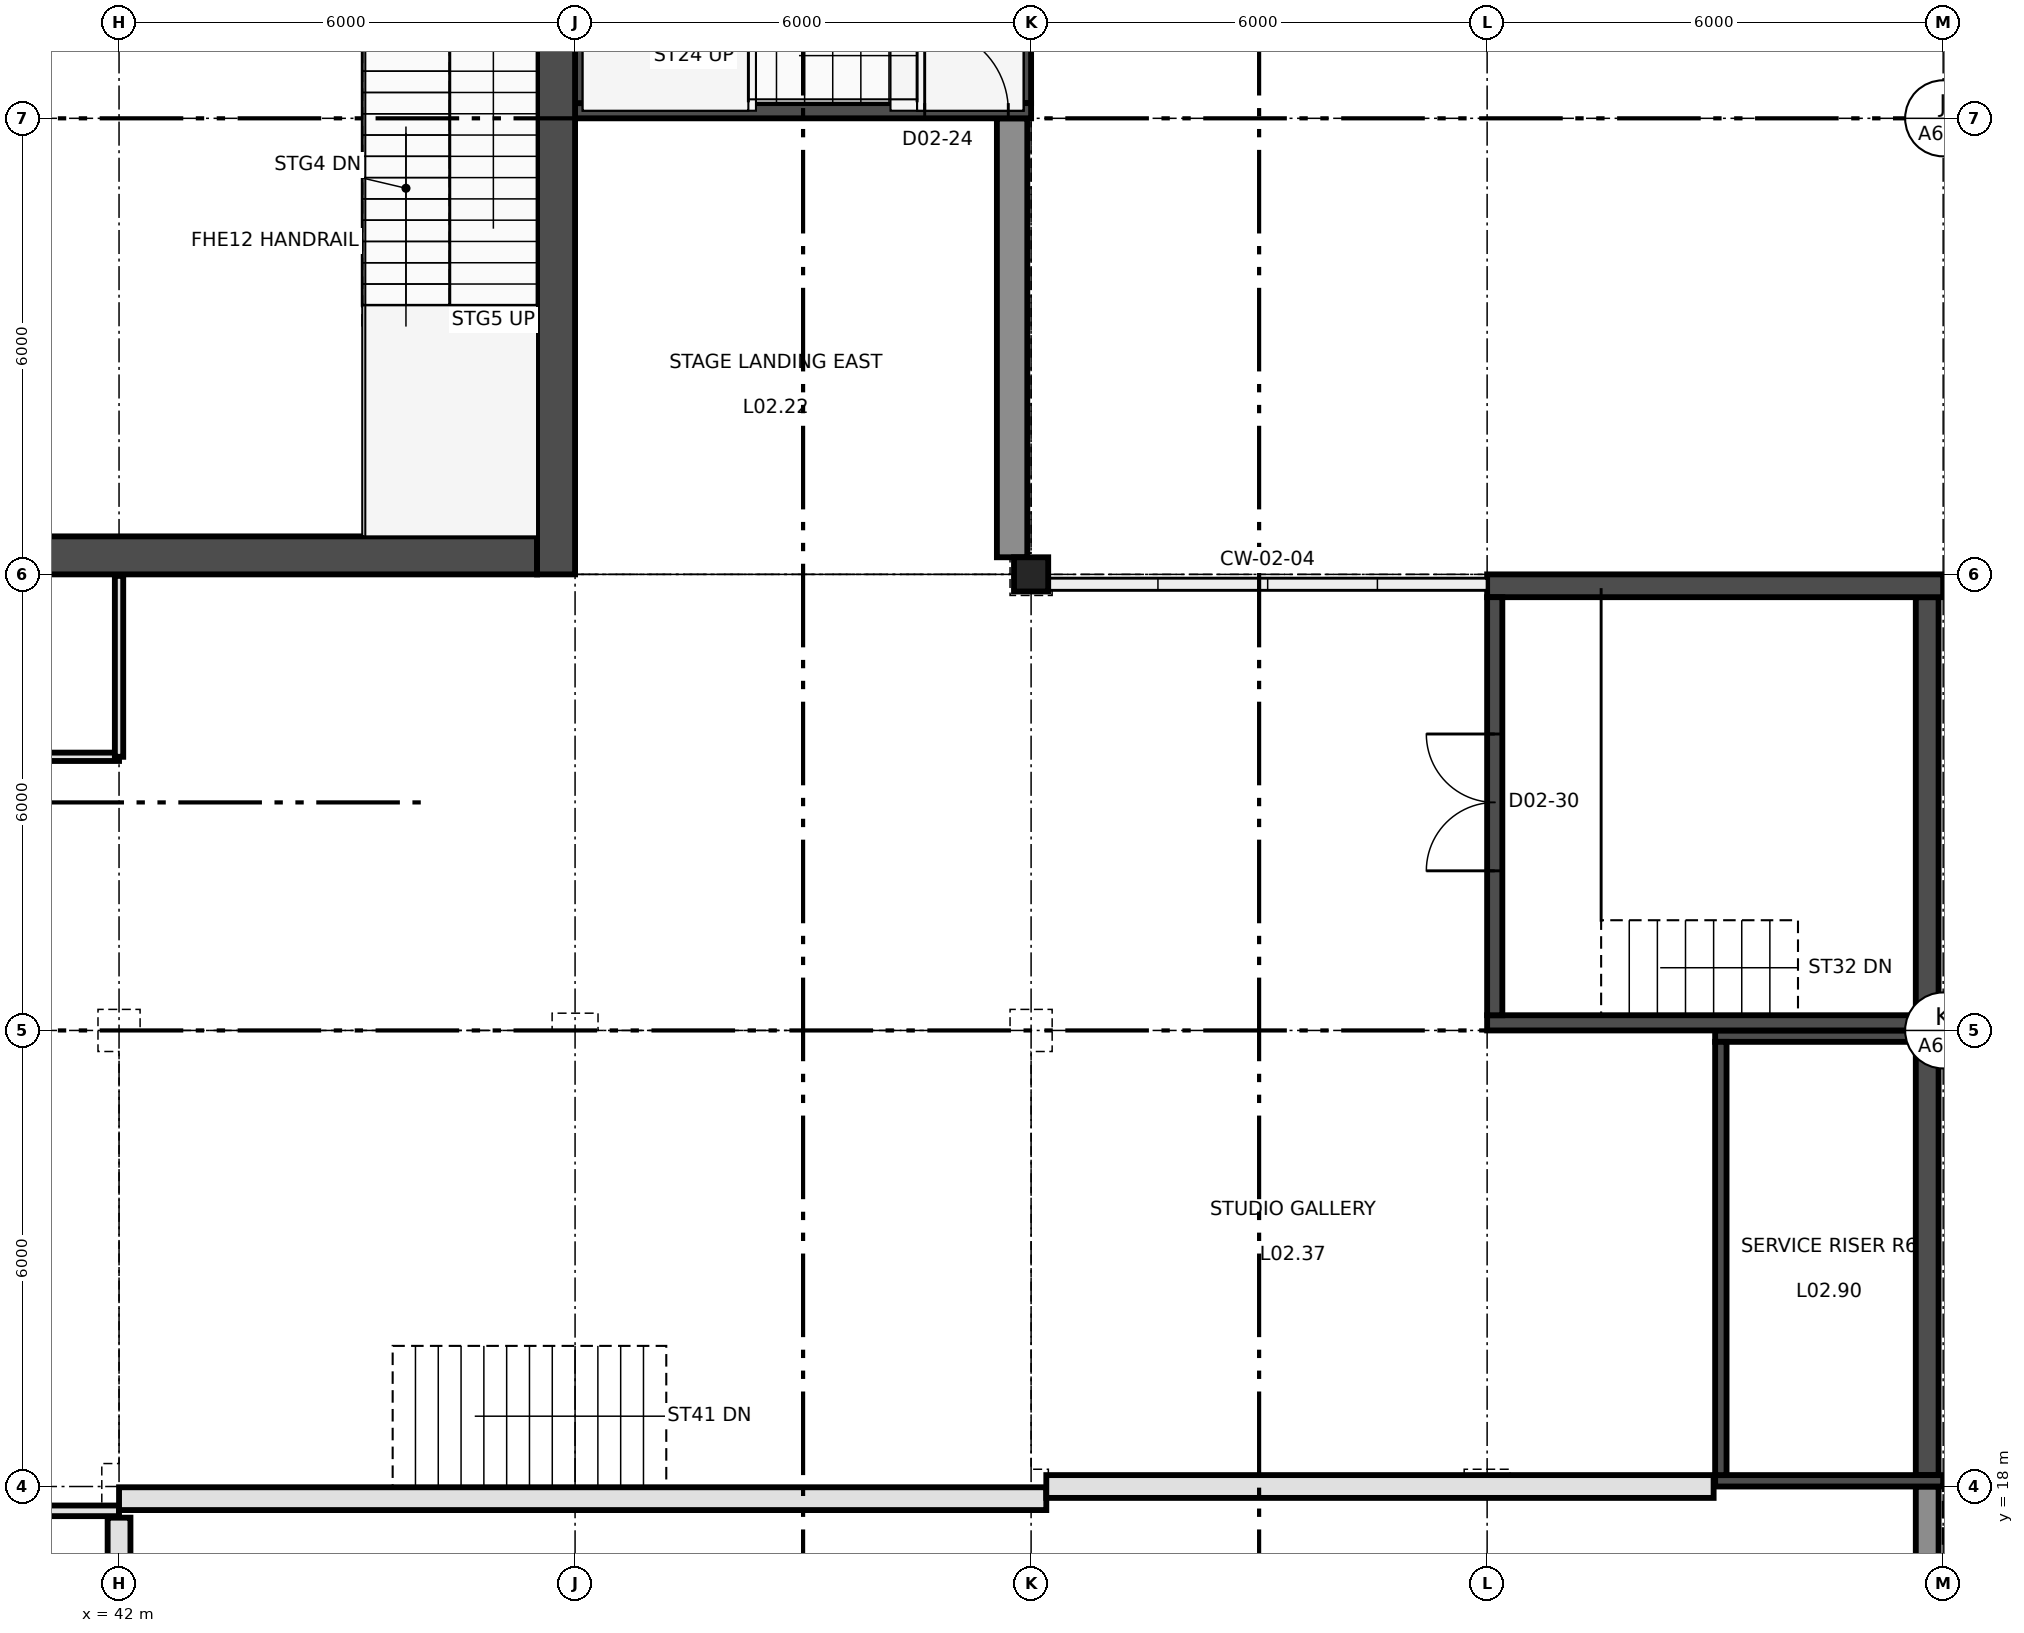
"""IFC4 building model, lengths in metres.
Left out: names, types, materials, properties, quantities, classifications, styles, units other than length and angle.
Written with IfcOpenShell. Run it as: python <this file> out.ifc"""

import sys

from ifc_helpers import new_model, si_unit, direction, frame, frame_2d, origin, origin_2d, place, context, subcontext, project, spatial, rectangle, extrude, element, fill, save


model = new_model("IFC4")
c1 = context("Model", 3, precision=1e-05, world=origin(), true_north=direction((0.0, 1.0)))
c2 = subcontext(c1, "Body", "Model", "MODEL_VIEW")
j1 = project(units=[si_unit("LENGTHUNIT", "METRE"), si_unit("PLANEANGLEUNIT", "RADIAN")], contexts=[c1])
p1 = place(None, origin())
s1 = spatial("IfcSite", under=j1, at=p1, CompositionType="ELEMENT")
p2 = place(p1, origin())
s2 = spatial("IfcBuilding", under=s1, at=p2, CompositionType="ELEMENT")
p3 = place(p2, frame((0.0, 0.0, 12.0)))
s3 = spatial("IfcBuildingStorey", under=s2, at=p3, CompositionType="ELEMENT", Elevation=12.0)
p4 = place(p3, frame((54.0, 30.0, 0.0), z_axis=(0.0, 0.0, 1.0), x_axis=(1.0, 0.0, 0.0)))
e1 = element("IfcColumn", 1, at=p4, inside=s3, PredefinedType="COLUMN", context=c2, shape_type="SweptSolid", body=[
    extrude(rectangle(XDim=0.45, YDim=0.45, at=origin_2d()), origin(), (0.0, 0.0, 1.0), 4.5),
])
p5 = place(p3, frame((48.0, 36.1, 0.0), z_axis=(0.0, 0.0, 1.0), x_axis=(1.0, 0.0, 0.0)))
e2 = element("IfcWall", 2, at=p5, inside=s3, PredefinedType="SHEAR", context=c2, shape_type="SweptSolid", body=[
    extrude(rectangle(XDim=6.0, YDim=0.2, at=frame_2d((3.0, 0.0))), origin(), (0.0, 0.0, 1.0), 4.5),
])
p6 = place(p5, frame((4.6, 0.0, 0.0)))
e3 = element("IfcOpeningElement", 3, at=p6, cuts=e2, PredefinedType="OPENING", context=c2, shape_type="SweptSolid", body=[
    extrude(rectangle(XDim=1.1, YDim=2.2, at=frame_2d((0.55, 1.1))), frame((0.0, 0.11, 0.0), z_axis=(0.0, -1.0, 0.0), x_axis=(1.0, 0.0, 0.0)), (0.0, 0.0, 1.0), 0.22),
])
for number, where, z_axis, x_axis in (
    (4, (48.1, 36.2, 0.0), (0.0, 0.0, 1.0), (0.0, 1.0, 0.0)),
    (5, (53.9, 36.2, 0.0), (0.0, 0.0, 1.0), (0.0, 1.0, 0.0)),
):
    element("IfcWall", number, at=place(p3, frame(where, z_axis=z_axis, x_axis=x_axis)), inside=s3, PredefinedType="SHEAR", context=c2, shape_type="SweptSolid", body=[
        extrude(rectangle(XDim=5.6, YDim=0.2, at=frame_2d((2.8, 0.0))), origin(), (0.0, 0.0, 1.0), 4.5),
    ])
p7 = place(p3, frame((60.0, 29.85, 0.0), z_axis=(0.0, 0.0, 1.0), x_axis=(1.0, 0.0, 0.0)))
e6 = element("IfcWall", 6, at=p7, inside=s3, PredefinedType="SHEAR", context=c2, shape_type="SweptSolid", body=[
    extrude(rectangle(XDim=6.0, YDim=0.3, at=frame_2d((3.0, 0.0))), origin(), (0.0, 0.0, 1.0), 4.5),
])
p8 = place(p3, frame((60.0, 24.1, 0.0), z_axis=(0.0, 0.0, 1.0), x_axis=(1.0, 0.0, 0.0)))
e7 = element("IfcWall", 7, at=p8, inside=s3, PredefinedType="SHEAR", context=c2, shape_type="SweptSolid", body=[
    extrude(rectangle(XDim=6.0, YDim=0.2, at=frame_2d((3.0, 0.0))), origin(), (0.0, 0.0, 1.0), 4.5),
])
p9 = place(p3, frame((60.1, 24.2, 0.0), z_axis=(0.0, 0.0, 1.0), x_axis=(0.0, 1.0, 0.0)))
e8 = element("IfcWall", 8, at=p9, inside=s3, PredefinedType="SHEAR", context=c2, shape_type="SweptSolid", body=[
    extrude(rectangle(XDim=5.5, YDim=0.2, at=frame_2d((2.75, 0.0))), origin(), (0.0, 0.0, 1.0), 4.5),
])
p10 = place(p9, frame((1.9, 0.0, 0.0)))
e9 = element("IfcOpeningElement", 9, at=p10, cuts=e8, PredefinedType="OPENING", context=c2, shape_type="SweptSolid", body=[
    extrude(rectangle(XDim=1.8, YDim=2.2, at=frame_2d((0.9, 1.1))), frame((0.0, 0.11, 0.0), z_axis=(0.0, -1.0, 0.0), x_axis=(1.0, 0.0, 0.0)), (0.0, 0.0, 1.0), 0.22),
])
p11 = place(p3, frame((65.79, 24.2, 0.0), z_axis=(0.0, 0.0, 1.0), x_axis=(0.0, 1.0, 0.0)))
e10 = element("IfcWall", 10, at=p11, inside=s3, PredefinedType="SHEAR", context=c2, shape_type="SweptSolid", body=[
    extrude(rectangle(XDim=5.5, YDim=0.3, at=frame_2d((2.75, 0.0))), origin(), (0.0, 0.0, 1.0), 4.5),
])
for number, where, z_axis, x_axis in (
    (11, (63.0, 23.925, 0.0), (0.0, 0.0, 1.0), (1.0, 0.0, 0.0)),
    (12, (63.0, 18.075, 0.0), (0.0, 0.0, 1.0), (1.0, 0.0, 0.0)),
):
    element("IfcWall", number, at=place(p3, frame(where, z_axis=z_axis, x_axis=x_axis)), inside=s3, PredefinedType="SHEAR", context=c2, shape_type="SweptSolid", body=[
        extrude(rectangle(XDim=3.0, YDim=0.15, at=frame_2d((1.5, 0.0))), origin(), (0.0, 0.0, 1.0), 4.5),
    ])
p12 = place(p3, frame((63.075, 18.15, 0.0), z_axis=(0.0, 0.0, 1.0), x_axis=(0.0, 1.0, 0.0)))
e13 = element("IfcWall", 13, at=p12, inside=s3, PredefinedType="SHEAR", context=c2, shape_type="SweptSolid", body=[
    extrude(rectangle(XDim=5.7, YDim=0.15, at=frame_2d((2.85, 0.0))), origin(), (0.0, 0.0, 1.0), 4.5),
])
p13 = place(p3, frame((65.79, 18.15, 0.0), z_axis=(0.0, 0.0, 1.0), x_axis=(0.0, 1.0, 0.0)))
e14 = element("IfcWall", 14, at=p13, inside=s3, PredefinedType="SHEAR", context=c2, shape_type="SweptSolid", body=[
    extrude(rectangle(XDim=5.7, YDim=0.3, at=frame_2d((2.85, 0.0))), origin(), (0.0, 0.0, 1.0), 4.5),
])
p14 = place(p3, frame((65.79, 0.0, 0.0), z_axis=(0.0, 0.0, 1.0), x_axis=(0.0, 1.0, 0.0)))
e15 = element("IfcWall", 15, at=p14, inside=s3, PredefinedType="SOLIDWALL", context=c2, shape_type="SweptSolid", body=[
    extrude(rectangle(XDim=18.0, YDim=0.3, at=frame_2d((9.0, 0.0))), origin(), (0.0, 0.0, 1.0), 4.5),
])
p15 = place(p3, frame((47.75, 30.0, 0.0), z_axis=(0.0, 0.0, 1.0), x_axis=(0.0, 1.0, 0.0)))
e16 = element("IfcWall", 16, at=p15, inside=s3, PredefinedType="SHEAR", context=c2, shape_type="SweptSolid", body=[
    extrude(rectangle(XDim=24.0, YDim=0.5, at=frame_2d((12.0, 0.0))), origin(), (0.0, 0.0, 1.0), 4.5),
])
p16 = place(p3, frame((18.5, 30.25, 0.0), z_axis=(0.0, 0.0, 1.0), x_axis=(1.0, 0.0, 0.0)))
e17 = element("IfcWall", 17, at=p16, inside=s3, PredefinedType="SHEAR", context=c2, shape_type="SweptSolid", body=[
    extrude(rectangle(XDim=29.0, YDim=0.5, at=frame_2d((14.5, 0.0))), origin(), (0.0, 0.0, 1.0), 4.5),
])
p17 = place(p3, frame((53.75, 36.0, 0.0), z_axis=(0.0, 0.0, 1.0), x_axis=(0.0, -1.0, 0.0)))
e18 = element("IfcWall", 18, at=p17, inside=s3, PredefinedType="SOLIDWALL", context=c2, shape_type="SweptSolid", body=[
    extrude(rectangle(XDim=5.775, YDim=0.4, at=frame_2d((2.887, 0.0))), origin(), (0.0, 0.0, 1.0), 3.55),
])
p18 = place(p3, frame((38.22, 27.6, 0.0), z_axis=(0.0, 0.0, 1.0), x_axis=(1.0, 0.0, 0.0)))
e19 = element("IfcWall", 19, at=p18, inside=s3, PredefinedType="PARTITIONING", context=c2, shape_type="SweptSolid", body=[
    extrude(rectangle(XDim=3.78, YDim=0.11, at=frame_2d((1.89, 0.0))), origin(), (0.0, 0.0, 1.0), 4.28),
])
p19 = place(p18, frame((1.53, 0.0, 0.0)))
e20 = element("IfcOpeningElement", 20, at=p19, cuts=e19, PredefinedType="OPENING", context=c2, shape_type="SweptSolid", body=[
    extrude(rectangle(XDim=0.75, YDim=2.04, at=frame_2d((0.375, 1.02))), frame((0.0, 0.065, 0.0), z_axis=(0.0, -1.0, 0.0), x_axis=(1.0, 0.0, 0.0)), (0.0, 0.0, 1.0), 0.13),
])
p20 = place(p3, frame((42.0, 27.6, 0.0), z_axis=(0.0, 0.0, 1.0), x_axis=(0.0, 1.0, 0.0)))
e21 = element("IfcWall", 21, at=p20, inside=s3, PredefinedType="PARTITIONING", context=c2, shape_type="SweptSolid", body=[
    extrude(rectangle(XDim=2.38, YDim=0.11, at=frame_2d((1.19, 0.0))), origin(), (0.0, 0.0, 1.0), 4.28),
])
p21 = place(p3, frame((36.0, 17.68, 0.0), z_axis=(0.0, 0.0, 1.0), x_axis=(1.0, 0.0, 0.0)))
e22 = element("IfcWall", 22, at=p21, inside=s3, PredefinedType="PARTITIONING", context=c2, shape_type="SweptSolid", body=[
    extrude(rectangle(XDim=6.0, YDim=0.14, at=frame_2d((3.0, 0.0))), origin(), (0.0, 0.0, 1.0), 4.28),
])
p22 = place(p3, frame((42.0, 17.84, 0.0), z_axis=(0.0, 0.0, 1.0), x_axis=(1.0, 0.0, 0.0)))
e23 = element("IfcWall", 23, at=p22, inside=s3, PredefinedType="PARTITIONING", context=c2, shape_type="SweptSolid", body=[
    extrude(rectangle(XDim=12.2, YDim=0.3, at=frame_2d((6.1, 0.0))), origin(), (0.0, 0.0, 1.0), 4.28),
])
p23 = place(p3, frame((54.2, 18.0, 0.0), z_axis=(0.0, 0.0, 1.0), x_axis=(1.0, 0.0, 0.0)))
e24 = element("IfcWall", 24, at=p23, inside=s3, PredefinedType="PARTITIONING", context=c2, shape_type="SweptSolid", body=[
    extrude(rectangle(XDim=8.78, YDim=0.3, at=frame_2d((4.39, 0.0))), origin(), (0.0, 0.0, 1.0), 4.28),
])
p24 = place(p3, frame((42.0, 6.02, 0.0), z_axis=(0.0, 0.0, 1.0), x_axis=(0.0, 1.0, 0.0)))
e25 = element("IfcWall", 25, at=p24, inside=s3, PredefinedType="PARTITIONING", context=c2, shape_type="SweptSolid", body=[
    extrude(rectangle(XDim=11.57, YDim=0.3, at=frame_2d((5.785, 0.0))), origin(), (0.0, 0.0, 1.0), 4.28),
])
p25 = place(p6, origin())
e26 = element("IfcDoor", 26, at=p25, inside=s3, OperationType="SINGLE_SWING_LEFT", PredefinedType="DOOR", context=c2, shape_type="SweptSolid", body=[
    extrude(rectangle(XDim=1.1, YDim=2.2, at=frame_2d((0.55, 1.1))), frame((0.0, 0.025, 0.0), z_axis=(0.0, -1.0, 0.0), x_axis=(1.0, 0.0, 0.0)), (0.0, 0.0, 1.0), 0.05),
])
fill(e3, e26)
p26 = place(p10, frame((1.8, 0.0, 0.0), z_axis=(0.0, 0.0, 1.0), x_axis=(-1.0, 0.0, 0.0)))
e27 = element("IfcDoor", 27, at=p26, inside=s3, OperationType="DOUBLE_DOOR_SINGLE_SWING", PredefinedType="DOOR", context=c2, shape_type="SweptSolid", body=[
    extrude(rectangle(XDim=1.8, YDim=2.2, at=frame_2d((0.9, 1.1))), frame((0.0, 0.025, 0.0), z_axis=(0.0, -1.0, 0.0), x_axis=(1.0, 0.0, 0.0)), (0.0, 0.0, 1.0), 0.05),
])
fill(e9, e27)
save(model, sys.argv[1])
